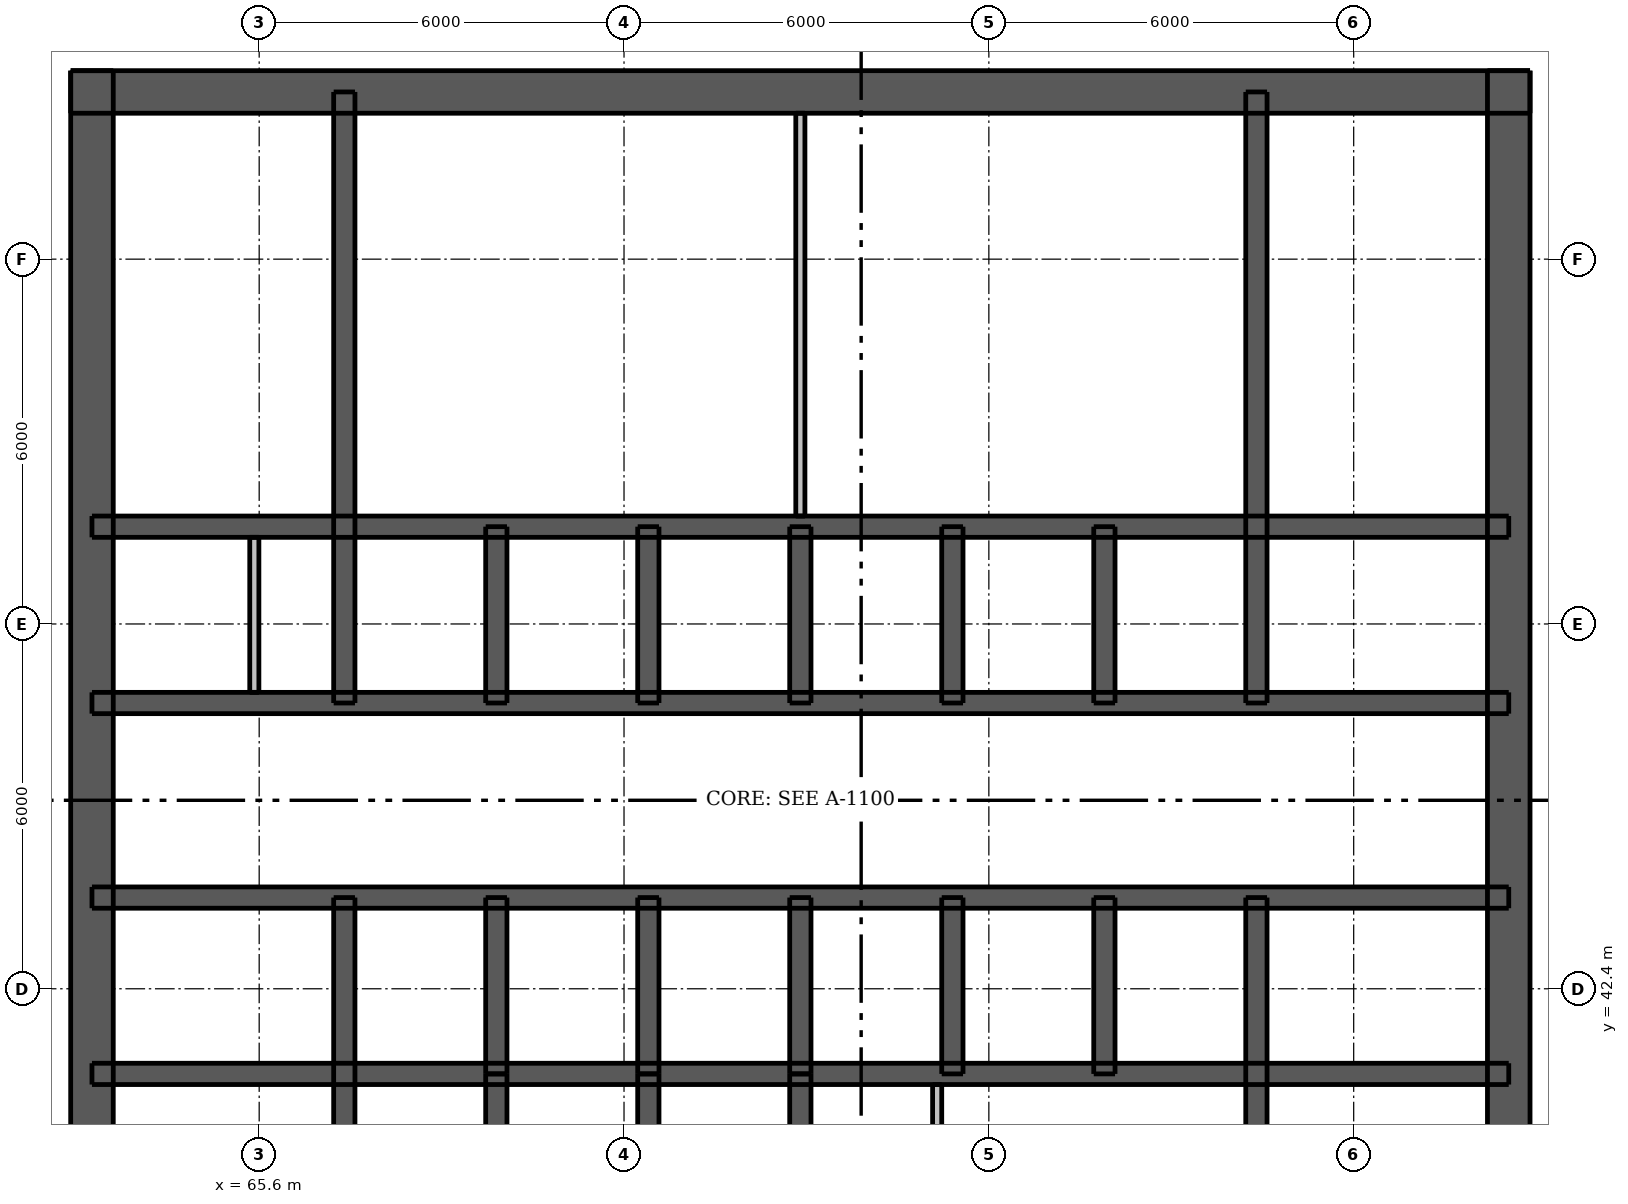
"""IFC4 building model, lengths in metres.
Left out: names, types, materials, properties, quantities, classifications, styles, units other than length and angle.
Written with IfcOpenShell. Run it as: python <this file> out.ifc"""

import sys

from ifc_helpers import new_model, si_unit, direction, frame, frame_2d, origin, place, context, subcontext, project, spatial, rectangle, extrude, element, fill, save


model = new_model("IFC4")
c1 = context("Model", 3, precision=1e-05, world=origin(), true_north=direction((0.0, 1.0)))
c2 = subcontext(c1, "Body", "Model", "MODEL_VIEW")
j1 = project(units=[si_unit("LENGTHUNIT", "METRE"), si_unit("PLANEANGLEUNIT", "RADIAN")], contexts=[c1])
p1 = place(None, origin())
s1 = spatial("IfcSite", under=j1, at=p1, CompositionType="ELEMENT")
p2 = place(p1, origin())
s2 = spatial("IfcBuilding", under=s1, at=p2, CompositionType="ELEMENT")
p3 = place(p2, frame((0.0, 0.0, 147.1)))
s3 = spatial("IfcBuildingStorey", under=s2, at=p3, CompositionType="ELEMENT", Elevation=147.1)
p4 = place(p3, frame((62.5, 57.15, 0.0), z_axis=(0.0, 0.0, 1.0), x_axis=(1.0, 0.0, 0.0)))
e1 = element("IfcWall", 1, at=p4, inside=s3, PredefinedType="SHEAR", context=c2, shape_type="SweptSolid", body=[
    extrude(rectangle(XDim=24.0, YDim=0.7, at=frame_2d((12.0, 0.0))), origin(), (0.0, 0.0, 1.0), 3.0),
])
p5 = place(p4, frame((20.938, 0.0, 0.0)))
e2 = element("IfcOpeningElement", 2, at=p5, cuts=e1, PredefinedType="OPENING", context=c2, shape_type="SweptSolid", body=[
    extrude(rectangle(XDim=1.1, YDim=2.1, at=frame_2d((0.55, 1.05))), frame((0.0, 0.36, 0.0), z_axis=(0.0, -1.0, 0.0), x_axis=(1.0, 0.0, 0.0)), (0.0, 0.0, 1.0), 0.72),
])
p6 = place(p4, frame((1.962, 0.0, 0.0)))
e3 = element("IfcOpeningElement", 3, at=p6, cuts=e1, PredefinedType="OPENING", context=c2, shape_type="SweptSolid", body=[
    extrude(rectangle(XDim=1.1, YDim=2.1, at=frame_2d((0.55, 1.05))), frame((0.0, 0.36, 0.0), z_axis=(0.0, -1.0, 0.0), x_axis=(1.0, 0.0, 0.0)), (0.0, 0.0, 1.0), 0.72),
])
p7 = place(p4, frame((7.887, 0.0, 0.0)))
e4 = element("IfcOpeningElement", 4, at=p7, cuts=e1, PredefinedType="OPENING", context=c2, shape_type="SweptSolid", body=[
    extrude(rectangle(XDim=0.9, YDim=2.1, at=frame_2d((0.45, 1.05))), frame((0.0, 0.36, 0.0), z_axis=(0.0, -1.0, 0.0), x_axis=(1.0, 0.0, 0.0)), (0.0, 0.0, 1.0), 0.72),
])
p8 = place(p4, frame((15.212, 0.0, 0.0)))
e5 = element("IfcOpeningElement", 5, at=p8, cuts=e1, PredefinedType="OPENING", context=c2, shape_type="SweptSolid", body=[
    extrude(rectangle(XDim=0.9, YDim=2.1, at=frame_2d((0.45, 1.05))), frame((0.0, 0.36, 0.0), z_axis=(0.0, -1.0, 0.0), x_axis=(1.0, 0.0, 0.0)), (0.0, 0.0, 1.0), 0.72),
])
p9 = place(p3, frame((62.85, 33.5, 0.0), z_axis=(0.0, 0.0, 1.0), x_axis=(0.0, 1.0, 0.0)))
e6 = element("IfcWall", 6, at=p9, inside=s3, PredefinedType="SHEAR", context=c2, shape_type="SweptSolid", body=[
    extrude(rectangle(XDim=24.0, YDim=0.7, at=frame_2d((12.0, 0.0))), origin(), (0.0, 0.0, 1.0), 3.0),
])
p10 = place(p9, frame((11.2, 0.0, 0.0)))
e7 = element("IfcOpeningElement", 7, at=p10, cuts=e6, PredefinedType="OPENING", context=c2, shape_type="SweptSolid", body=[
    extrude(rectangle(XDim=1.6, YDim=2.1, at=frame_2d((0.8, 1.05))), frame((0.0, 0.36, 0.0), z_axis=(0.0, -1.0, 0.0), x_axis=(1.0, 0.0, 0.0)), (0.0, 0.0, 1.0), 0.72),
])
p11 = place(p3, frame((86.15, 33.5, 0.0), z_axis=(0.0, 0.0, 1.0), x_axis=(0.0, 1.0, 0.0)))
e8 = element("IfcWall", 8, at=p11, inside=s3, PredefinedType="SHEAR", context=c2, shape_type="SweptSolid", body=[
    extrude(rectangle(XDim=24.0, YDim=0.7, at=frame_2d((12.0, 0.0))), origin(), (0.0, 0.0, 1.0), 3.0),
])
p12 = place(p11, frame((11.2, 0.0, 0.0)))
e9 = element("IfcOpeningElement", 9, at=p12, cuts=e8, PredefinedType="OPENING", context=c2, shape_type="SweptSolid", body=[
    extrude(rectangle(XDim=1.6, YDim=2.1, at=frame_2d((0.8, 1.05))), frame((0.0, 0.36, 0.0), z_axis=(0.0, -1.0, 0.0), x_axis=(1.0, 0.0, 0.0)), (0.0, 0.0, 1.0), 0.72),
])
p13 = place(p3, frame((62.85, 41.0, 0.0), z_axis=(0.0, 0.0, 1.0), x_axis=(1.0, 0.0, 0.0)))
e10 = element("IfcWall", 10, at=p13, inside=s3, PredefinedType="SHEAR", context=c2, shape_type="SweptSolid", body=[
    extrude(rectangle(XDim=23.3, YDim=0.35, at=frame_2d((11.65, 0.0))), origin(), (0.0, 0.0, 1.0), 3.0),
])
p14 = place(p3, frame((62.85, 43.9, 0.0), z_axis=(0.0, 0.0, 1.0), x_axis=(1.0, 0.0, 0.0)))
e11 = element("IfcWall", 11, at=p14, inside=s3, PredefinedType="SHEAR", context=c2, shape_type="SweptSolid", body=[
    extrude(rectangle(XDim=23.3, YDim=0.35, at=frame_2d((11.65, 0.0))), origin(), (0.0, 0.0, 1.0), 3.0),
])
p15 = place(p14, frame((1.712, 0.0, 0.0)))
e12 = element("IfcOpeningElement", 12, at=p15, cuts=e11, PredefinedType="OPENING", context=c2, shape_type="SweptSolid", body=[
    extrude(rectangle(XDim=0.9, YDim=2.1, at=frame_2d((0.45, 1.05))), frame((0.0, 0.185, 0.0), z_axis=(0.0, -1.0, 0.0), x_axis=(1.0, 0.0, 0.0)), (0.0, 0.0, 1.0), 0.37),
])
p16 = place(p14, frame((20.688, 0.0, 0.0)))
e13 = element("IfcOpeningElement", 13, at=p16, cuts=e11, PredefinedType="OPENING", context=c2, shape_type="SweptSolid", body=[
    extrude(rectangle(XDim=0.9, YDim=2.1, at=frame_2d((0.45, 1.05))), frame((0.0, 0.185, 0.0), z_axis=(0.0, -1.0, 0.0), x_axis=(1.0, 0.0, 0.0)), (0.0, 0.0, 1.0), 0.37),
])
p17 = place(p14, frame((4.85, 0.0, 0.0)))
e14 = element("IfcOpeningElement", 14, at=p17, cuts=e11, PredefinedType="OPENING", context=c2, shape_type="SweptSolid", body=[
    extrude(rectangle(XDim=1.1, YDim=2.1, at=frame_2d((0.55, 1.05))), frame((0.0, 0.185, 0.0), z_axis=(0.0, -1.0, 0.0), x_axis=(1.0, 0.0, 0.0)), (0.0, 0.0, 1.0), 0.37),
])
p18 = place(p14, frame((7.35, 0.0, 0.0)))
e15 = element("IfcOpeningElement", 15, at=p18, cuts=e11, PredefinedType="OPENING", context=c2, shape_type="SweptSolid", body=[
    extrude(rectangle(XDim=1.1, YDim=2.1, at=frame_2d((0.55, 1.05))), frame((0.0, 0.185, 0.0), z_axis=(0.0, -1.0, 0.0), x_axis=(1.0, 0.0, 0.0)), (0.0, 0.0, 1.0), 0.37),
])
p19 = place(p14, frame((9.85, 0.0, 0.0)))
e16 = element("IfcOpeningElement", 16, at=p19, cuts=e11, PredefinedType="OPENING", context=c2, shape_type="SweptSolid", body=[
    extrude(rectangle(XDim=1.1, YDim=2.1, at=frame_2d((0.55, 1.05))), frame((0.0, 0.185, 0.0), z_axis=(0.0, -1.0, 0.0), x_axis=(1.0, 0.0, 0.0)), (0.0, 0.0, 1.0), 0.37),
])
p20 = place(p14, frame((12.35, 0.0, 0.0)))
e17 = element("IfcOpeningElement", 17, at=p20, cuts=e11, PredefinedType="OPENING", context=c2, shape_type="SweptSolid", body=[
    extrude(rectangle(XDim=1.1, YDim=2.1, at=frame_2d((0.55, 1.05))), frame((0.0, 0.185, 0.0), z_axis=(0.0, -1.0, 0.0), x_axis=(1.0, 0.0, 0.0)), (0.0, 0.0, 1.0), 0.37),
])
p21 = place(p14, frame((14.85, 0.0, 0.0)))
e18 = element("IfcOpeningElement", 18, at=p21, cuts=e11, PredefinedType="OPENING", context=c2, shape_type="SweptSolid", body=[
    extrude(rectangle(XDim=1.1, YDim=2.1, at=frame_2d((0.55, 1.05))), frame((0.0, 0.185, 0.0), z_axis=(0.0, -1.0, 0.0), x_axis=(1.0, 0.0, 0.0)), (0.0, 0.0, 1.0), 0.37),
])
p22 = place(p14, frame((17.35, 0.0, 0.0)))
e19 = element("IfcOpeningElement", 19, at=p22, cuts=e11, PredefinedType="OPENING", context=c2, shape_type="SweptSolid", body=[
    extrude(rectangle(XDim=1.1, YDim=2.1, at=frame_2d((0.55, 1.05))), frame((0.0, 0.185, 0.0), z_axis=(0.0, -1.0, 0.0), x_axis=(1.0, 0.0, 0.0)), (0.0, 0.0, 1.0), 0.37),
])
p23 = place(p3, frame((62.85, 47.1, 0.0), z_axis=(0.0, 0.0, 1.0), x_axis=(1.0, 0.0, 0.0)))
e20 = element("IfcWall", 20, at=p23, inside=s3, PredefinedType="SHEAR", context=c2, shape_type="SweptSolid", body=[
    extrude(rectangle(XDim=23.3, YDim=0.35, at=frame_2d((11.65, 0.0))), origin(), (0.0, 0.0, 1.0), 3.0),
])
p24 = place(p23, frame((1.06, 0.0, 0.0)))
e21 = element("IfcOpeningElement", 21, at=p24, cuts=e20, PredefinedType="OPENING", context=c2, shape_type="SweptSolid", body=[
    extrude(rectangle(XDim=0.9, YDim=2.1, at=frame_2d((0.45, 1.05))), frame((0.0, 0.185, 0.0), z_axis=(0.0, -1.0, 0.0), x_axis=(1.0, 0.0, 0.0)), (0.0, 0.0, 1.0), 0.37),
])
p25 = place(p23, frame((2.923, 0.0, 0.0)))
e22 = element("IfcOpeningElement", 22, at=p25, cuts=e20, PredefinedType="OPENING", context=c2, shape_type="SweptSolid", body=[
    extrude(rectangle(XDim=0.8, YDim=2.1, at=frame_2d((0.4, 1.05))), frame((0.0, 0.185, 0.0), z_axis=(0.0, -1.0, 0.0), x_axis=(1.0, 0.0, 0.0)), (0.0, 0.0, 1.0), 0.37),
])
p26 = place(p23, frame((20.688, 0.0, 0.0)))
e23 = element("IfcOpeningElement", 23, at=p26, cuts=e20, PredefinedType="OPENING", context=c2, shape_type="SweptSolid", body=[
    extrude(rectangle(XDim=0.9, YDim=2.1, at=frame_2d((0.45, 1.05))), frame((0.0, 0.185, 0.0), z_axis=(0.0, -1.0, 0.0), x_axis=(1.0, 0.0, 0.0)), (0.0, 0.0, 1.0), 0.37),
])
p27 = place(p3, frame((62.85, 50.0, 0.0), z_axis=(0.0, 0.0, 1.0), x_axis=(1.0, 0.0, 0.0)))
e24 = element("IfcWall", 24, at=p27, inside=s3, PredefinedType="SHEAR", context=c2, shape_type="SweptSolid", body=[
    extrude(rectangle(XDim=23.3, YDim=0.35, at=frame_2d((11.65, 0.0))), origin(), (0.0, 0.0, 1.0), 3.0),
])
p28 = place(p3, frame((67.0, 33.85, 0.0), z_axis=(0.0, 0.0, 1.0), x_axis=(0.0, 1.0, 0.0)))
e25 = element("IfcWall", 25, at=p28, inside=s3, PredefinedType="SHEAR", context=c2, shape_type="SweptSolid", body=[
    extrude(rectangle(XDim=10.05, YDim=0.35, at=frame_2d((5.025, 0.0))), origin(), (0.0, 0.0, 1.0), 3.0),
])
p29 = place(p28, frame((0.55, 0.0, 0.0)))
e26 = element("IfcOpeningElement", 26, at=p29, cuts=e25, PredefinedType="OPENING", context=c2, shape_type="SweptSolid", body=[
    extrude(rectangle(XDim=1.1, YDim=2.1, at=frame_2d((0.55, 1.05))), frame((0.0, 0.185, 0.0), z_axis=(0.0, -1.0, 0.0), x_axis=(1.0, 0.0, 0.0)), (0.0, 0.0, 1.0), 0.37),
])
for number, where, z_axis, x_axis in (
    (27, (67.0, 47.1, 0.0), (0.0, 0.0, 1.0), (0.0, 1.0, 0.0)),
    (28, (82.0, 33.85, 0.0), (0.0, 0.0, 1.0), (0.0, 1.0, 0.0)),
    (29, (82.0, 47.1, 0.0), (0.0, 0.0, 1.0), (0.0, 1.0, 0.0)),
):
    element("IfcWall", number, at=place(p3, frame(where, z_axis=z_axis, x_axis=x_axis)), inside=s3, PredefinedType="SHEAR", context=c2, shape_type="SweptSolid", body=[
        extrude(rectangle(XDim=10.05, YDim=0.35, at=frame_2d((5.025, 0.0))), origin(), (0.0, 0.0, 1.0), 3.0),
    ])
for number, where, z_axis, x_axis in (
    (30, (69.5, 41.0, 0.0), (0.0, 0.0, 1.0), (0.0, 1.0, 0.0)),
    (31, (69.5, 47.1, 0.0), (0.0, 0.0, 1.0), (0.0, 1.0, 0.0)),
    (32, (72.0, 41.0, 0.0), (0.0, 0.0, 1.0), (0.0, 1.0, 0.0)),
    (33, (72.0, 47.1, 0.0), (0.0, 0.0, 1.0), (0.0, 1.0, 0.0)),
    (34, (74.5, 41.0, 0.0), (0.0, 0.0, 1.0), (0.0, 1.0, 0.0)),
    (35, (74.5, 47.1, 0.0), (0.0, 0.0, 1.0), (0.0, 1.0, 0.0)),
    (36, (77.0, 41.0, 0.0), (0.0, 0.0, 1.0), (0.0, 1.0, 0.0)),
    (37, (77.0, 47.1, 0.0), (0.0, 0.0, 1.0), (0.0, 1.0, 0.0)),
    (38, (79.5, 41.0, 0.0), (0.0, 0.0, 1.0), (0.0, 1.0, 0.0)),
    (39, (79.5, 47.1, 0.0), (0.0, 0.0, 1.0), (0.0, 1.0, 0.0)),
    (40, (69.5, 38.1, 0.0), (0.0, 0.0, 1.0), (0.0, 1.0, 0.0)),
    (41, (72.0, 38.1, 0.0), (0.0, 0.0, 1.0), (0.0, 1.0, 0.0)),
    (42, (74.5, 38.1, 0.0), (0.0, 0.0, 1.0), (0.0, 1.0, 0.0)),
):
    element("IfcWall", number, at=place(p3, frame(where, z_axis=z_axis, x_axis=x_axis)), inside=s3, PredefinedType="SHEAR", context=c2, shape_type="SweptSolid", body=[
        extrude(rectangle(XDim=2.9, YDim=0.35, at=frame_2d((1.45, 0.0))), origin(), (0.0, 0.0, 1.0), 3.0),
    ])
p30 = place(p3, frame((76.75, 34.2, 0.0), z_axis=(0.0, 0.0, 1.0), x_axis=(0.0, 1.0, 0.0)))
e43 = element("IfcWall", 43, at=p30, inside=s3, PredefinedType="PLUMBINGWALL", context=c2, shape_type="SweptSolid", body=[
    extrude(rectangle(XDim=6.625, YDim=0.15, at=frame_2d((3.312, 0.0))), origin(), (0.0, 0.0, 1.0), 3.0),
])
p31 = place(p3, frame((65.52, 47.275, 0.0), z_axis=(0.0, 0.0, 1.0), x_axis=(0.0, 1.0, 0.0)))
e44 = element("IfcWall", 44, at=p31, inside=s3, PredefinedType="PLUMBINGWALL", context=c2, shape_type="SweptSolid", body=[
    extrude(rectangle(XDim=2.55, YDim=0.15, at=frame_2d((1.275, 0.0))), origin(), (0.0, 0.0, 1.0), 3.0),
])
p32 = place(p3, frame((74.5, 50.175, 0.0), z_axis=(0.0, 0.0, 1.0), x_axis=(0.0, 1.0, 0.0)))
e45 = element("IfcWall", 45, at=p32, inside=s3, PredefinedType="PLUMBINGWALL", context=c2, shape_type="SweptSolid", body=[
    extrude(rectangle(XDim=6.625, YDim=0.15, at=frame_2d((3.312, 0.0))), origin(), (0.0, 0.0, 1.0), 3.0),
])
p33 = place(p5, origin())
e46 = element("IfcDoor", 46, at=p33, inside=s3, OperationType="SINGLE_SWING_RIGHT", PredefinedType="DOOR", context=c2, shape_type="SweptSolid", body=[
    extrude(rectangle(XDim=1.1, YDim=2.1, at=frame_2d((0.55, 1.05))), frame((0.0, -0.288, 0.0), z_axis=(0.0, -1.0, 0.0), x_axis=(1.0, 0.0, 0.0)), (0.0, 0.0, 1.0), 0.05),
])
fill(e2, e46)
p34 = place(p6, origin())
e47 = element("IfcDoor", 47, at=p34, inside=s3, OperationType="SINGLE_SWING_LEFT", PredefinedType="DOOR", context=c2, shape_type="SweptSolid", body=[
    extrude(rectangle(XDim=1.1, YDim=2.1, at=frame_2d((0.55, 1.05))), frame((0.0, -0.288, 0.0), z_axis=(0.0, -1.0, 0.0), x_axis=(1.0, 0.0, 0.0)), (0.0, 0.0, 1.0), 0.05),
])
fill(e3, e47)
p35 = place(p10, origin())
e48 = element("IfcDoor", 48, at=p35, inside=s3, OperationType="DOUBLE_DOOR_SINGLE_SWING", PredefinedType="DOOR", context=c2, shape_type="SweptSolid", body=[
    extrude(rectangle(XDim=1.6, YDim=2.1, at=frame_2d((0.8, 1.05))), frame((0.0, -0.288, 0.0), z_axis=(0.0, -1.0, 0.0), x_axis=(1.0, 0.0, 0.0)), (0.0, 0.0, 1.0), 0.05),
])
fill(e7, e48)
p36 = place(p12, origin())
e49 = element("IfcDoor", 49, at=p36, inside=s3, OperationType="DOUBLE_DOOR_SINGLE_SWING", PredefinedType="DOOR", context=c2, shape_type="SweptSolid", body=[
    extrude(rectangle(XDim=1.6, YDim=2.1, at=frame_2d((0.8, 1.05))), frame((0.0, 0.337, 0.0), z_axis=(0.0, -1.0, 0.0), x_axis=(1.0, 0.0, 0.0)), (0.0, 0.0, 1.0), 0.05),
])
fill(e9, e49)
p37 = place(p15, origin())
e50 = element("IfcDoor", 50, at=p37, inside=s3, OperationType="SINGLE_SWING_LEFT", PredefinedType="DOOR", context=c2, shape_type="SweptSolid", body=[
    extrude(rectangle(XDim=0.9, YDim=2.1, at=frame_2d((0.45, 1.05))), frame((0.0, -0.112, 0.0), z_axis=(0.0, -1.0, 0.0), x_axis=(1.0, 0.0, 0.0)), (0.0, 0.0, 1.0), 0.05),
])
fill(e12, e50)
p38 = place(p16, origin())
e51 = element("IfcDoor", 51, at=p38, inside=s3, OperationType="SINGLE_SWING_LEFT", PredefinedType="DOOR", context=c2, shape_type="SweptSolid", body=[
    extrude(rectangle(XDim=0.9, YDim=2.1, at=frame_2d((0.45, 1.05))), frame((0.0, -0.112, 0.0), z_axis=(0.0, -1.0, 0.0), x_axis=(1.0, 0.0, 0.0)), (0.0, 0.0, 1.0), 0.05),
])
fill(e13, e51)
p39 = place(p24, origin())
e52 = element("IfcDoor", 52, at=p39, inside=s3, OperationType="SINGLE_SWING_LEFT", PredefinedType="DOOR", context=c2, shape_type="SweptSolid", body=[
    extrude(rectangle(XDim=0.9, YDim=2.1, at=frame_2d((0.45, 1.05))), frame((0.0, 0.163, 0.0), z_axis=(0.0, -1.0, 0.0), x_axis=(1.0, 0.0, 0.0)), (0.0, 0.0, 1.0), 0.05),
])
fill(e21, e52)
p40 = place(p25, origin())
e53 = element("IfcDoor", 53, at=p40, inside=s3, OperationType="SINGLE_SWING_RIGHT", PredefinedType="DOOR", context=c2, shape_type="SweptSolid", body=[
    extrude(rectangle(XDim=0.8, YDim=2.1, at=frame_2d((0.4, 1.05))), frame((0.0, 0.163, 0.0), z_axis=(0.0, -1.0, 0.0), x_axis=(1.0, 0.0, 0.0)), (0.0, 0.0, 1.0), 0.05),
])
fill(e22, e53)
p41 = place(p26, origin())
e54 = element("IfcDoor", 54, at=p41, inside=s3, OperationType="SINGLE_SWING_LEFT", PredefinedType="DOOR", context=c2, shape_type="SweptSolid", body=[
    extrude(rectangle(XDim=0.9, YDim=2.1, at=frame_2d((0.45, 1.05))), frame((0.0, 0.163, 0.0), z_axis=(0.0, -1.0, 0.0), x_axis=(1.0, 0.0, 0.0)), (0.0, 0.0, 1.0), 0.05),
])
fill(e23, e54)
p42 = place(p7, origin())
e55 = element("IfcDoor", 55, at=p42, inside=s3, OperationType="SINGLE_SWING_RIGHT", PredefinedType="DOOR", context=c2, shape_type="SweptSolid", body=[
    extrude(rectangle(XDim=0.9, YDim=2.1, at=frame_2d((0.45, 1.05))), frame((0.0, -0.288, 0.0), z_axis=(0.0, -1.0, 0.0), x_axis=(1.0, 0.0, 0.0)), (0.0, 0.0, 1.0), 0.05),
])
fill(e4, e55)
p43 = place(p8, origin())
e56 = element("IfcDoor", 56, at=p43, inside=s3, OperationType="SINGLE_SWING_RIGHT", PredefinedType="DOOR", context=c2, shape_type="SweptSolid", body=[
    extrude(rectangle(XDim=0.9, YDim=2.1, at=frame_2d((0.45, 1.05))), frame((0.0, -0.288, 0.0), z_axis=(0.0, -1.0, 0.0), x_axis=(1.0, 0.0, 0.0)), (0.0, 0.0, 1.0), 0.05),
])
fill(e5, e56)
p44 = place(p17, origin())
e57 = element("IfcDoor", 57, at=p44, inside=s3, OperationType="DOUBLE_DOOR_SLIDING", PredefinedType="DOOR", context=c2, shape_type="SweptSolid", body=[
    extrude(rectangle(XDim=1.1, YDim=2.1, at=frame_2d((0.55, 1.05))), frame((0.0, 0.025, 0.0), z_axis=(0.0, -1.0, 0.0), x_axis=(1.0, 0.0, 0.0)), (0.0, 0.0, 1.0), 0.05),
])
fill(e14, e57)
p45 = place(p18, origin())
e58 = element("IfcDoor", 58, at=p45, inside=s3, OperationType="DOUBLE_DOOR_SLIDING", PredefinedType="DOOR", context=c2, shape_type="SweptSolid", body=[
    extrude(rectangle(XDim=1.1, YDim=2.1, at=frame_2d((0.55, 1.05))), frame((0.0, 0.025, 0.0), z_axis=(0.0, -1.0, 0.0), x_axis=(1.0, 0.0, 0.0)), (0.0, 0.0, 1.0), 0.05),
])
fill(e15, e58)
p46 = place(p19, origin())
e59 = element("IfcDoor", 59, at=p46, inside=s3, OperationType="DOUBLE_DOOR_SLIDING", PredefinedType="DOOR", context=c2, shape_type="SweptSolid", body=[
    extrude(rectangle(XDim=1.1, YDim=2.1, at=frame_2d((0.55, 1.05))), frame((0.0, 0.025, 0.0), z_axis=(0.0, -1.0, 0.0), x_axis=(1.0, 0.0, 0.0)), (0.0, 0.0, 1.0), 0.05),
])
fill(e16, e59)
p47 = place(p20, origin())
e60 = element("IfcDoor", 60, at=p47, inside=s3, OperationType="DOUBLE_DOOR_SLIDING", PredefinedType="DOOR", context=c2, shape_type="SweptSolid", body=[
    extrude(rectangle(XDim=1.1, YDim=2.1, at=frame_2d((0.55, 1.05))), frame((0.0, 0.025, 0.0), z_axis=(0.0, -1.0, 0.0), x_axis=(1.0, 0.0, 0.0)), (0.0, 0.0, 1.0), 0.05),
])
fill(e17, e60)
p48 = place(p21, origin())
e61 = element("IfcDoor", 61, at=p48, inside=s3, OperationType="DOUBLE_DOOR_SLIDING", PredefinedType="DOOR", context=c2, shape_type="SweptSolid", body=[
    extrude(rectangle(XDim=1.1, YDim=2.1, at=frame_2d((0.55, 1.05))), frame((0.0, 0.025, 0.0), z_axis=(0.0, -1.0, 0.0), x_axis=(1.0, 0.0, 0.0)), (0.0, 0.0, 1.0), 0.05),
])
fill(e18, e61)
p49 = place(p22, origin())
e62 = element("IfcDoor", 62, at=p49, inside=s3, OperationType="DOUBLE_DOOR_SLIDING", PredefinedType="DOOR", context=c2, shape_type="SweptSolid", body=[
    extrude(rectangle(XDim=1.1, YDim=2.1, at=frame_2d((0.55, 1.05))), frame((0.0, 0.025, 0.0), z_axis=(0.0, -1.0, 0.0), x_axis=(1.0, 0.0, 0.0)), (0.0, 0.0, 1.0), 0.05),
])
fill(e19, e62)
save(model, sys.argv[1])
